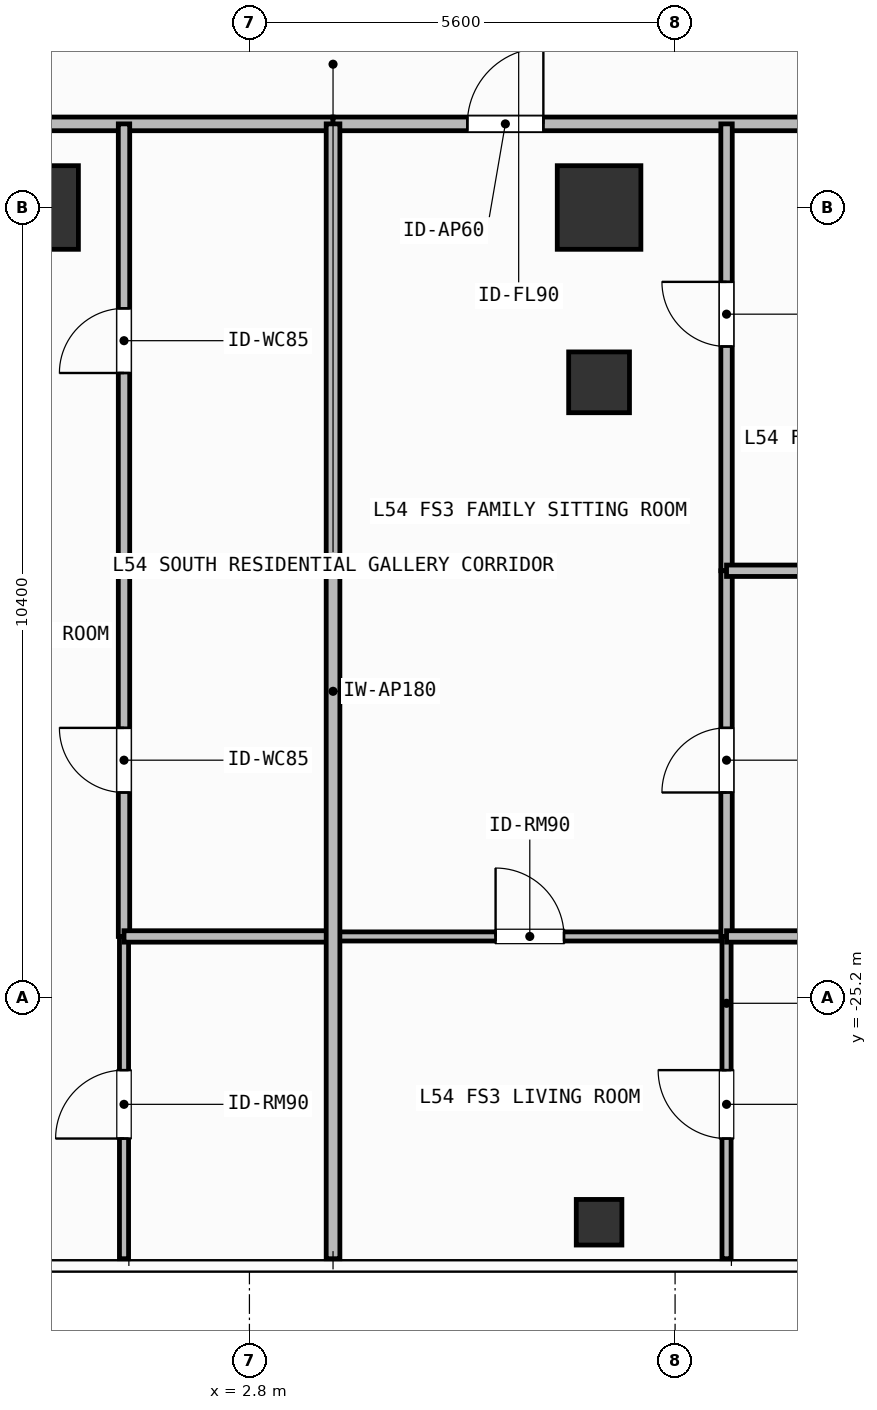
"""IFC4 building model, lengths in metres.
Left out: names, types, materials, properties, quantities, classifications, styles, units other than length and angle.
Written with IfcOpenShell. Run it as: python <this file> out.ifc"""

import sys

from ifc_helpers import new_model, si_unit, direction, frame, frame_2d, origin, origin_2d, place, context, subcontext, project, spatial, rectangle, hollow_rectangle, extrude, element, fill, save


model = new_model("IFC4")
c1 = context("Model", 3, precision=1e-05, world=origin(), true_north=direction((0.0, 1.0)))
c2 = subcontext(c1, "Body", "Model", "MODEL_VIEW")
j1 = project(units=[si_unit("LENGTHUNIT", "METRE"), si_unit("PLANEANGLEUNIT", "RADIAN")], contexts=[c1])
p1 = place(None, origin())
s1 = spatial("IfcSite", under=j1, at=p1, CompositionType="ELEMENT")
p2 = place(p1, origin())
s2 = spatial("IfcBuilding", under=s1, at=p2, CompositionType="ELEMENT")
p3 = place(p2, frame((0.0, 0.0, 219.6)))
s3 = spatial("IfcBuildingStorey", under=s2, at=p3, CompositionType="ELEMENT", Elevation=219.6)
for number, where, z_axis, x_axis in (
    (1, (0.0, -14.8, 0.0), (0.0, 0.0, 1.0), (1.0, 0.0, 0.0)),
    (2, (7.4, -14.8, 0.0), (0.0, 0.0, 1.0), (1.0, 0.0, 0.0)),
):
    element("IfcColumn", number, at=place(p3, frame(where, z_axis=z_axis, x_axis=x_axis)), inside=s3, PredefinedType="COLUMN", context=c2, shape_type="SweptSolid", body=[
        extrude(rectangle(XDim=1.1, YDim=1.1, at=origin_2d()), origin(), (0.0, 0.0, 1.0), 3.9),
    ])
p4 = place(p3, frame((7.4, -17.1, 0.0), z_axis=(0.0, 0.0, 1.0), x_axis=(1.0, 0.0, 0.0)))
e3 = element("IfcColumn", 3, at=p4, inside=s3, PredefinedType="COLUMN", context=c2, shape_type="SweptSolid", body=[
    extrude(hollow_rectangle(XDim=0.8, YDim=0.8, WallThickness=0.036, at=origin_2d()), origin(), (0.0, 0.0, 1.0), 3.9),
])
p5 = place(p3, frame((7.4, -28.15, 0.0), z_axis=(0.0, 0.0, 1.0), x_axis=(1.0, 0.0, 0.0)))
e4 = element("IfcColumn", 4, at=p5, inside=s3, PredefinedType="COLUMN", context=c2, shape_type="SweptSolid", body=[
    extrude(hollow_rectangle(XDim=0.6, YDim=0.6, WallThickness=0.028, at=origin_2d()), origin(), (0.0, 0.0, 1.0), 3.9),
])
p6 = place(p3, frame((-2.154, -13.7, 0.0), z_axis=(0.0, 0.0, 1.0), x_axis=(1.0, 0.0, 0.0)))
e5 = element("IfcWall", 5, at=p6, inside=s3, PredefinedType="PARTITIONING", context=c2, shape_type="SweptSolid", body=[
    extrude(rectangle(XDim=6.054, YDim=0.18, at=frame_2d((3.027, 0.0))), origin(), (0.0, 0.0, 1.0), 3.68),
])
p7 = place(p6, frame((0.511, 0.0, 0.0)))
e6 = element("IfcOpeningElement", 6, at=p7, cuts=e5, PredefinedType="OPENING", context=c2, shape_type="SweptSolid", body=[
    extrude(rectangle(XDim=1.0, YDim=2.2, at=frame_2d((0.5, 1.1))), frame((0.0, 0.1, 0.0), z_axis=(0.0, -1.0, 0.0), x_axis=(1.0, 0.0, 0.0)), (0.0, 0.0, 1.0), 0.2),
])
p8 = place(p3, frame((1.15, -19.579, 0.0), z_axis=(0.0, 0.0, 1.0), x_axis=(0.0, 1.0, 0.0)))
e7 = element("IfcWall", 7, at=p8, inside=s3, PredefinedType="PARTITIONING", context=c2, shape_type="SweptSolid", body=[
    extrude(rectangle(XDim=5.879, YDim=0.15, at=frame_2d((2.939, 0.0))), origin(), (0.0, 0.0, 1.0), 3.68),
])
p9 = place(p8, frame((2.602, 0.0, 0.0)))
e8 = element("IfcOpeningElement", 8, at=p9, cuts=e7, PredefinedType="OPENING", context=c2, shape_type="SweptSolid", body=[
    extrude(rectangle(XDim=0.85, YDim=2.1, at=frame_2d((0.425, 1.05))), frame((0.0, 0.085, 0.0), z_axis=(0.0, -1.0, 0.0), x_axis=(1.0, 0.0, 0.0)), (0.0, 0.0, 1.0), 0.17),
])
p10 = place(p3, frame((1.15, -24.39, 0.0), z_axis=(0.0, 0.0, 1.0), x_axis=(0.0, 1.0, 0.0)))
e9 = element("IfcWall", 9, at=p10, inside=s3, PredefinedType="PARTITIONING", context=c2, shape_type="SweptSolid", body=[
    extrude(rectangle(XDim=4.811, YDim=0.15, at=frame_2d((2.405, 0.0))), origin(), (0.0, 0.0, 1.0), 3.68),
])
p11 = place(p10, frame((1.894, 0.0, 0.0)))
e10 = element("IfcOpeningElement", 10, at=p11, cuts=e9, PredefinedType="OPENING", context=c2, shape_type="SweptSolid", body=[
    extrude(rectangle(XDim=0.85, YDim=2.1, at=frame_2d((0.425, 1.05))), frame((0.0, 0.085, 0.0), z_axis=(0.0, -1.0, 0.0), x_axis=(1.0, 0.0, 0.0)), (0.0, 0.0, 1.0), 0.17),
])
p12 = place(p3, frame((1.15, -28.63, 0.0), z_axis=(0.0, 0.0, 1.0), x_axis=(0.0, 1.0, 0.0)))
e11 = element("IfcWall", 11, at=p12, inside=s3, PredefinedType="PARTITIONING", context=c2, shape_type="SweptSolid", body=[
    extrude(rectangle(XDim=4.24, YDim=0.12, at=frame_2d((2.12, 0.0))), origin(), (0.0, 0.0, 1.0), 3.68),
])
p13 = place(p12, frame((1.581, 0.0, 0.0)))
e12 = element("IfcOpeningElement", 12, at=p13, cuts=e11, PredefinedType="OPENING", context=c2, shape_type="SweptSolid", body=[
    extrude(rectangle(XDim=0.9, YDim=2.1, at=frame_2d((0.45, 1.05))), frame((0.0, 0.07, 0.0), z_axis=(0.0, -1.0, 0.0), x_axis=(1.0, 0.0, 0.0)), (0.0, 0.0, 1.0), 0.14),
])
p14 = place(p3, frame((3.9, -13.7, 0.0), z_axis=(0.0, 0.0, 1.0), x_axis=(1.0, 0.0, 0.0)))
e13 = element("IfcWall", 13, at=p14, inside=s3, PredefinedType="PARTITIONING", context=c2, shape_type="SweptSolid", body=[
    extrude(rectangle(XDim=7.927, YDim=0.18, at=frame_2d((3.963, 0.0))), origin(), (0.0, 0.0, 1.0), 3.68),
])
p15 = place(p14, frame((1.767, 0.0, 0.0)))
e14 = element("IfcOpeningElement", 14, at=p15, cuts=e13, PredefinedType="OPENING", context=c2, shape_type="SweptSolid", body=[
    extrude(rectangle(XDim=1.0, YDim=2.2, at=frame_2d((0.5, 1.1))), frame((0.0, 0.1, 0.0), z_axis=(0.0, -1.0, 0.0), x_axis=(1.0, 0.0, 0.0)), (0.0, 0.0, 1.0), 0.2),
])
p16 = place(p3, frame((3.9, -24.39, 0.0), z_axis=(0.0, 0.0, 1.0), x_axis=(1.0, 0.0, 0.0)))
e15 = element("IfcWall", 15, at=p16, inside=s3, PredefinedType="PARTITIONING", context=c2, shape_type="SweptSolid", body=[
    extrude(rectangle(XDim=5.177, YDim=0.12, at=frame_2d((2.588, 0.0))), origin(), (0.0, 0.0, 1.0), 3.68),
])
p17 = place(p16, frame((2.138, 0.0, 0.0)))
e16 = element("IfcOpeningElement", 16, at=p17, cuts=e15, PredefinedType="OPENING", context=c2, shape_type="SweptSolid", body=[
    extrude(rectangle(XDim=0.9, YDim=2.1, at=frame_2d((0.45, 1.05))), frame((0.0, 0.07, 0.0), z_axis=(0.0, -1.0, 0.0), x_axis=(1.0, 0.0, 0.0)), (0.0, 0.0, 1.0), 0.14),
])
p18 = place(p3, frame((9.077, -19.579, 0.0), z_axis=(0.0, 0.0, 1.0), x_axis=(0.0, 1.0, 0.0)))
e17 = element("IfcWall", 17, at=p18, inside=s3, PredefinedType="PARTITIONING", context=c2, shape_type="SweptSolid", body=[
    extrude(rectangle(XDim=5.879, YDim=0.15, at=frame_2d((2.939, 0.0))), origin(), (0.0, 0.0, 1.0), 3.68),
])
p19 = place(p18, frame((2.95, 0.0, 0.0)))
e18 = element("IfcOpeningElement", 18, at=p19, cuts=e17, PredefinedType="OPENING", context=c2, shape_type="SweptSolid", body=[
    extrude(rectangle(XDim=0.85, YDim=2.1, at=frame_2d((0.425, 1.05))), frame((0.0, 0.085, 0.0), z_axis=(0.0, -1.0, 0.0), x_axis=(1.0, 0.0, 0.0)), (0.0, 0.0, 1.0), 0.17),
])
p20 = place(p3, frame((9.077, -24.39, 0.0), z_axis=(0.0, 0.0, 1.0), x_axis=(0.0, 1.0, 0.0)))
e19 = element("IfcWall", 19, at=p20, inside=s3, PredefinedType="PARTITIONING", context=c2, shape_type="SweptSolid", body=[
    extrude(rectangle(XDim=4.811, YDim=0.15, at=frame_2d((2.405, 0.0))), origin(), (0.0, 0.0, 1.0), 3.68),
])
p21 = place(p20, frame((1.894, 0.0, 0.0)))
e20 = element("IfcOpeningElement", 20, at=p21, cuts=e19, PredefinedType="OPENING", context=c2, shape_type="SweptSolid", body=[
    extrude(rectangle(XDim=0.85, YDim=2.1, at=frame_2d((0.425, 1.05))), frame((0.0, 0.085, 0.0), z_axis=(0.0, -1.0, 0.0), x_axis=(1.0, 0.0, 0.0)), (0.0, 0.0, 1.0), 0.17),
])
p22 = place(p3, frame((9.077, -28.63, 0.0), z_axis=(0.0, 0.0, 1.0), x_axis=(0.0, 1.0, 0.0)))
e21 = element("IfcWall", 21, at=p22, inside=s3, PredefinedType="PARTITIONING", context=c2, shape_type="SweptSolid", body=[
    extrude(rectangle(XDim=4.24, YDim=0.12, at=frame_2d((2.12, 0.0))), origin(), (0.0, 0.0, 1.0), 3.68),
])
p23 = place(p22, frame((1.581, 0.0, 0.0)))
e22 = element("IfcOpeningElement", 22, at=p23, cuts=e21, PredefinedType="OPENING", context=c2, shape_type="SweptSolid", body=[
    extrude(rectangle(XDim=0.9, YDim=2.1, at=frame_2d((0.45, 1.05))), frame((0.0, 0.07, 0.0), z_axis=(0.0, -1.0, 0.0), x_axis=(1.0, 0.0, 0.0)), (0.0, 0.0, 1.0), 0.14),
])
for number, where, z_axis, x_axis in (
    (23, (1.15, -19.579, 0.0), (0.0, 0.0, 1.0), (1.0, 0.0, 0.0)),
    (24, (1.15, -24.39, 0.0), (0.0, 0.0, 1.0), (1.0, 0.0, 0.0)),
    (25, (9.077, -19.579, 0.0), (0.0, 0.0, 1.0), (1.0, 0.0, 0.0)),
    (26, (9.077, -24.39, 0.0), (0.0, 0.0, 1.0), (1.0, 0.0, 0.0)),
):
    element("IfcWall", number, at=place(p3, frame(where, z_axis=z_axis, x_axis=x_axis)), inside=s3, PredefinedType="PARTITIONING", context=c2, shape_type="SweptSolid", body=[
        extrude(rectangle(XDim=2.75, YDim=0.15, at=frame_2d((1.375, 0.0))), origin(), (0.0, 0.0, 1.0), 3.68),
    ])
p24 = place(p3, frame((3.9, -28.63, 0.0), z_axis=(0.0, 0.0, 1.0), x_axis=(0.0, 1.0, 0.0)))
e27 = element("IfcWall", 27, at=p24, inside=s3, PredefinedType="PARTITIONING", context=c2, shape_type="SweptSolid", body=[
    extrude(rectangle(XDim=14.93, YDim=0.18, at=frame_2d((7.465, 0.0))), origin(), (0.0, 0.0, 1.0), 3.68),
])
p25 = place(p9, origin())
e28 = element("IfcDoor", 28, at=p25, inside=s3, OperationType="SINGLE_SWING_LEFT", PredefinedType="DOOR", context=c2, shape_type="SweptSolid", body=[
    extrude(rectangle(XDim=0.85, YDim=2.1, at=frame_2d((0.425, 1.05))), frame((0.0, 0.025, 0.0), z_axis=(0.0, -1.0, 0.0), x_axis=(1.0, 0.0, 0.0)), (0.0, 0.0, 1.0), 0.05),
])
fill(e8, e28)
p26 = place(p11, origin())
e29 = element("IfcDoor", 29, at=p26, inside=s3, OperationType="SINGLE_SWING_RIGHT", PredefinedType="DOOR", context=c2, shape_type="SweptSolid", body=[
    extrude(rectangle(XDim=0.85, YDim=2.1, at=frame_2d((0.425, 1.05))), frame((0.0, 0.025, 0.0), z_axis=(0.0, -1.0, 0.0), x_axis=(1.0, 0.0, 0.0)), (0.0, 0.0, 1.0), 0.05),
])
fill(e10, e29)
p27 = place(p13, origin())
e30 = element("IfcDoor", 30, at=p27, inside=s3, OperationType="SINGLE_SWING_LEFT", PredefinedType="DOOR", context=c2, shape_type="SweptSolid", body=[
    extrude(rectangle(XDim=0.9, YDim=2.1, at=frame_2d((0.45, 1.05))), frame((0.0, 0.025, 0.0), z_axis=(0.0, -1.0, 0.0), x_axis=(1.0, 0.0, 0.0)), (0.0, 0.0, 1.0), 0.05),
])
fill(e12, e30)
p28 = place(p15, origin())
e31 = element("IfcDoor", 31, at=p28, inside=s3, OperationType="SINGLE_SWING_RIGHT", PredefinedType="DOOR", context=c2, shape_type="SweptSolid", body=[
    extrude(rectangle(XDim=1.0, YDim=2.2, at=frame_2d((0.5, 1.1))), frame((0.0, 0.025, 0.0), z_axis=(0.0, -1.0, 0.0), x_axis=(1.0, 0.0, 0.0)), (0.0, 0.0, 1.0), 0.05),
])
fill(e14, e31)
p29 = place(p17, origin())
e32 = element("IfcDoor", 32, at=p29, inside=s3, OperationType="SINGLE_SWING_LEFT", PredefinedType="DOOR", context=c2, shape_type="SweptSolid", body=[
    extrude(rectangle(XDim=0.9, YDim=2.1, at=frame_2d((0.45, 1.05))), frame((0.0, 0.025, 0.0), z_axis=(0.0, -1.0, 0.0), x_axis=(1.0, 0.0, 0.0)), (0.0, 0.0, 1.0), 0.05),
])
fill(e16, e32)
p30 = place(p19, origin())
e33 = element("IfcDoor", 33, at=p30, inside=s3, OperationType="SINGLE_SWING_RIGHT", PredefinedType="DOOR", context=c2, shape_type="SweptSolid", body=[
    extrude(rectangle(XDim=0.85, YDim=2.1, at=frame_2d((0.425, 1.05))), frame((0.0, 0.025, 0.0), z_axis=(0.0, -1.0, 0.0), x_axis=(1.0, 0.0, 0.0)), (0.0, 0.0, 1.0), 0.05),
])
fill(e18, e33)
p31 = place(p21, origin())
e34 = element("IfcDoor", 34, at=p31, inside=s3, OperationType="SINGLE_SWING_LEFT", PredefinedType="DOOR", context=c2, shape_type="SweptSolid", body=[
    extrude(rectangle(XDim=0.85, YDim=2.1, at=frame_2d((0.425, 1.05))), frame((0.0, 0.025, 0.0), z_axis=(0.0, -1.0, 0.0), x_axis=(1.0, 0.0, 0.0)), (0.0, 0.0, 1.0), 0.05),
])
fill(e20, e34)
p32 = place(p23, origin())
e35 = element("IfcDoor", 35, at=p32, inside=s3, OperationType="SINGLE_SWING_RIGHT", PredefinedType="DOOR", context=c2, shape_type="SweptSolid", body=[
    extrude(rectangle(XDim=0.9, YDim=2.1, at=frame_2d((0.45, 1.05))), frame((0.0, 0.025, 0.0), z_axis=(0.0, -1.0, 0.0), x_axis=(1.0, 0.0, 0.0)), (0.0, 0.0, 1.0), 0.05),
])
fill(e22, e35)
save(model, sys.argv[1])
